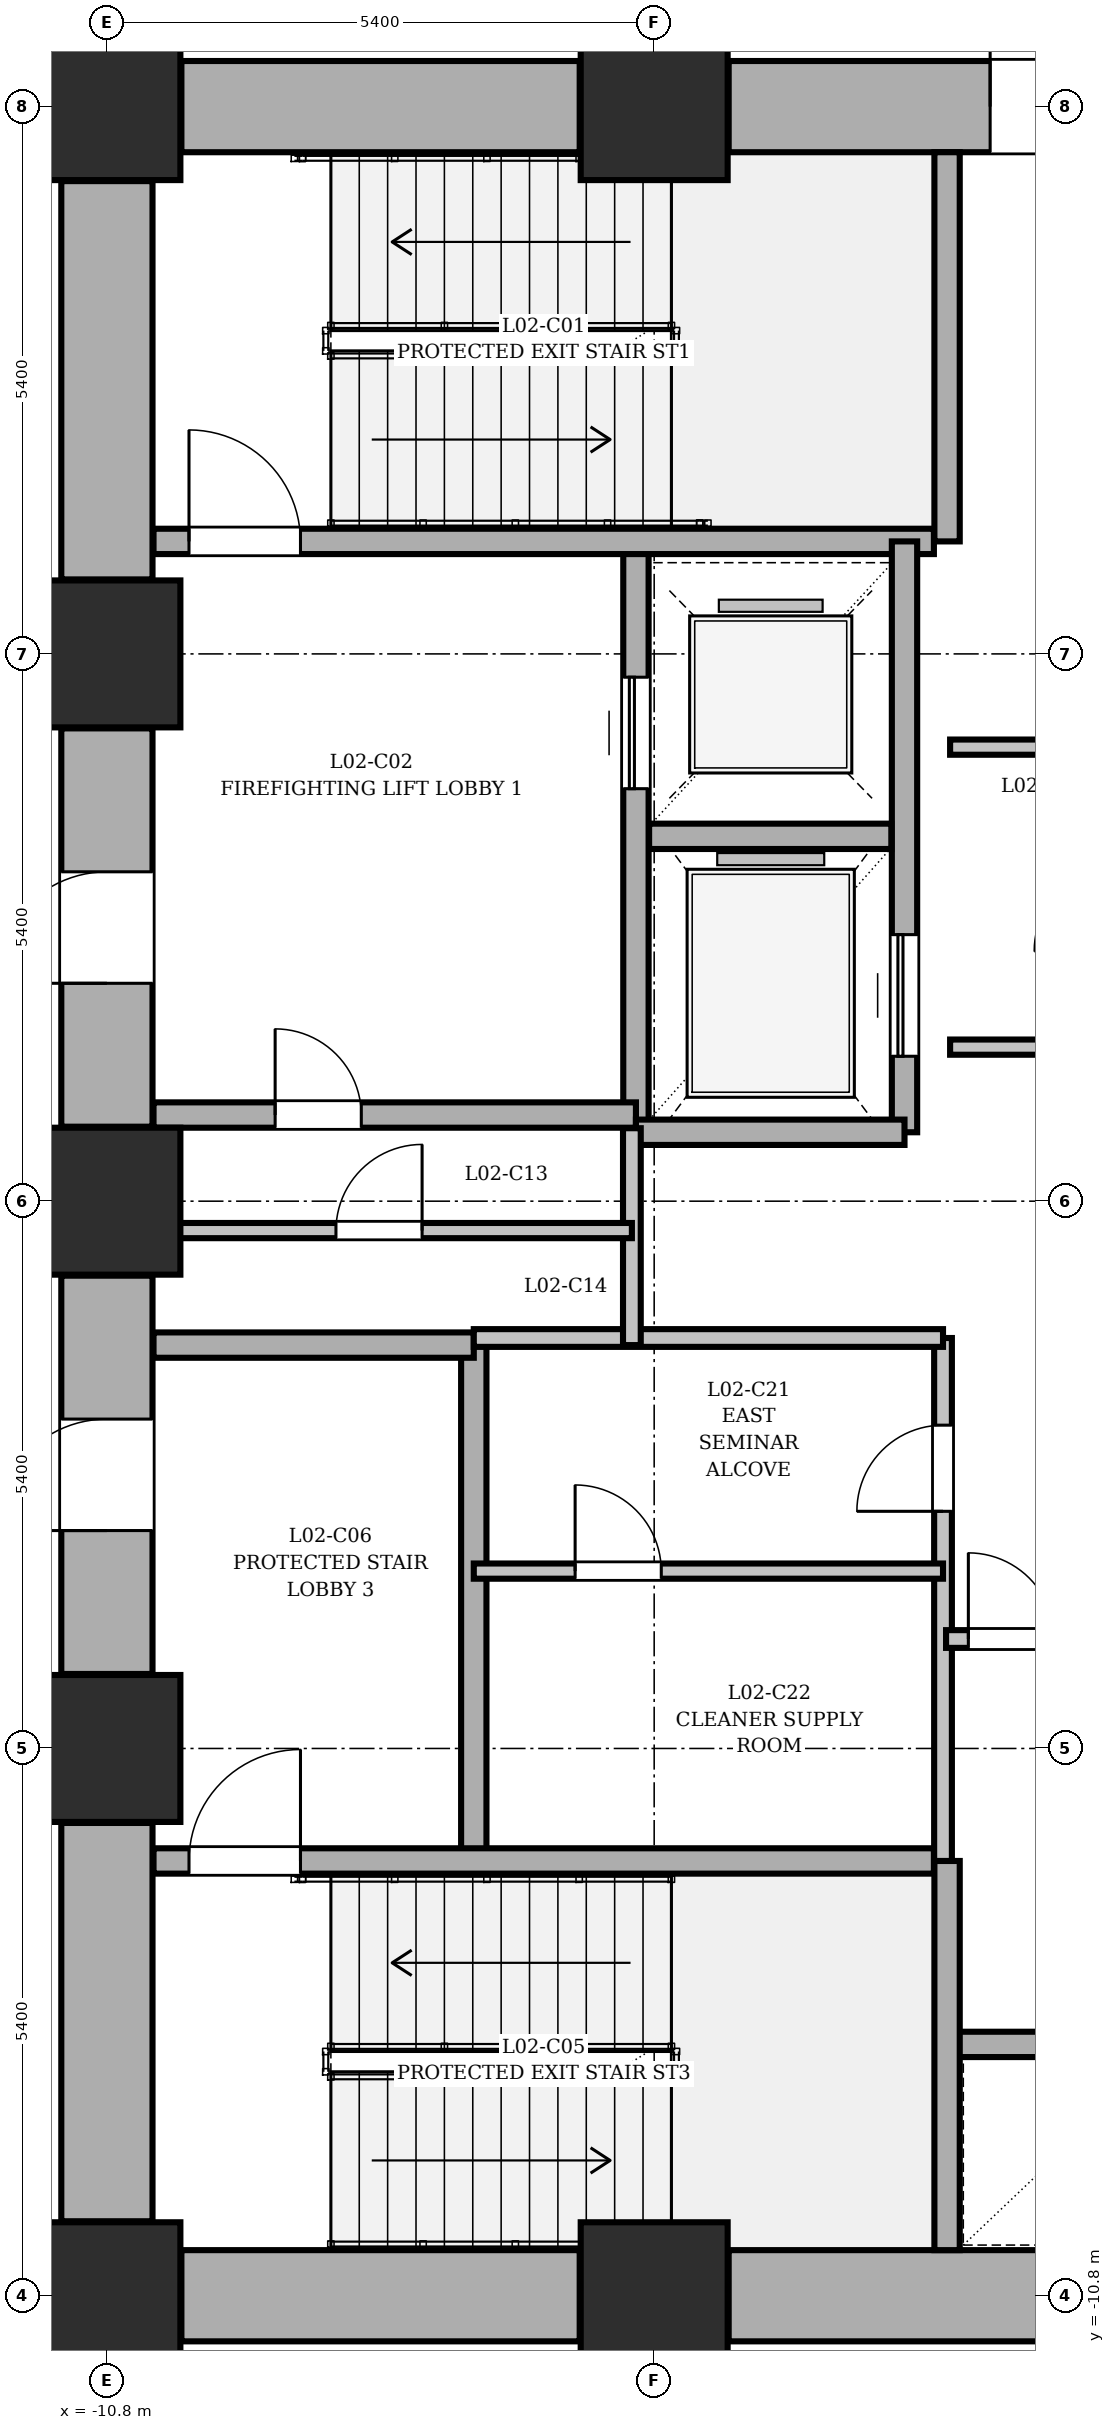
"""IFC4 building model, lengths in metres.
Left out: names, types, materials, properties, quantities, classifications, styles, units other than length and angle.
Written with IfcOpenShell. Run it as: python <this file> out.ifc"""

import sys

from ifc_helpers import new_model, si_unit, direction, frame, frame_2d, origin, origin_2d, place, context, subcontext, project, spatial, rectangle, extrude, element, fill, save


model = new_model("IFC4")
c1 = context("Model", 3, precision=1e-05, world=origin(), true_north=direction((0.0, 1.0)))
c2 = subcontext(c1, "Body", "Model", "MODEL_VIEW")
j1 = project(units=[si_unit("LENGTHUNIT", "METRE"), si_unit("PLANEANGLEUNIT", "RADIAN")], contexts=[c1])
p1 = place(None, origin())
s1 = spatial("IfcSite", under=j1, at=p1, CompositionType="ELEMENT")
p2 = place(p1, origin())
s2 = spatial("IfcBuilding", under=s1, at=p2, CompositionType="ELEMENT")
p3 = place(p2, frame((0.0, 0.0, 9.0)))
s3 = spatial("IfcBuildingStorey", under=s2, at=p3, CompositionType="ELEMENT", Elevation=9.0)
for number, where, z_axis, x_axis in (
    (1, (-10.8, -10.8, 0.0), (0.0, 0.0, 1.0), (1.0, 0.0, 0.0)),
    (2, (-10.8, -5.4, 0.0), (0.0, 0.0, 1.0), (1.0, 0.0, 0.0)),
    (3, (-10.8, 0.0, 0.0), (0.0, 0.0, 1.0), (1.0, 0.0, 0.0)),
    (4, (-10.8, 5.4, 0.0), (0.0, 0.0, 1.0), (1.0, 0.0, 0.0)),
    (5, (-10.8, 10.8, 0.0), (0.0, 0.0, 1.0), (1.0, 0.0, 0.0)),
    (6, (-5.4, -10.8, 0.0), (0.0, 0.0, 1.0), (1.0, 0.0, 0.0)),
    (7, (-5.4, 10.8, 0.0), (0.0, 0.0, 1.0), (1.0, 0.0, 0.0)),
):
    element("IfcColumn", number, at=place(p3, frame(where, z_axis=z_axis, x_axis=x_axis)), inside=s3, PredefinedType="COLUMN", context=c2, shape_type="SweptSolid", body=[
        extrude(rectangle(XDim=1.45, YDim=1.45, at=origin_2d()), origin(), (0.0, 0.0, 1.0), 4.5),
    ])
for number, where, z_axis, x_axis in (
    (8, (-10.065, -10.8, 0.0), (0.0, 0.0, 1.0), (1.0, 0.0, 0.0)),
    (9, (-10.065, 10.8, 0.0), (0.0, 0.0, 1.0), (1.0, 0.0, 0.0)),
    (10, (-10.8, -10.065, 0.0), (0.0, 0.0, 1.0), (0.0, 1.0, 0.0)),
    (11, (-4.665, -10.8, 0.0), (0.0, 0.0, 1.0), (1.0, 0.0, 0.0)),
):
    element("IfcWall", number, at=place(p3, frame(where, z_axis=z_axis, x_axis=x_axis)), inside=s3, PredefinedType="SHEAR", context=c2, shape_type="SweptSolid", body=[
        extrude(rectangle(XDim=3.93, YDim=0.9, at=frame_2d((1.965, 0.0))), origin(), (0.0, 0.0, 1.0), 4.5),
    ])
p4 = place(p3, frame((-4.665, 10.8, 0.0), z_axis=(0.0, 0.0, 1.0), x_axis=(1.0, 0.0, 0.0)))
e12 = element("IfcWall", 12, at=p4, inside=s3, PredefinedType="SHEAR", context=c2, shape_type="SweptSolid", body=[
    extrude(rectangle(XDim=3.93, YDim=0.9, at=frame_2d((1.965, 0.0))), origin(), (0.0, 0.0, 1.0), 4.5),
])
p5 = place(p4, frame((2.58, 0.0, 0.0)))
e13 = element("IfcOpeningElement", 13, at=p5, cuts=e12, PredefinedType="OPENING", context=c2, shape_type="SweptSolid", body=[
    extrude(rectangle(XDim=1.1, YDim=2.1, at=frame_2d((0.55, 1.05))), frame((0.0, 0.46, 0.0), z_axis=(0.0, -1.0, 0.0), x_axis=(1.0, 0.0, 0.0)), (0.0, 0.0, 1.0), 0.92),
])
p6 = place(p3, frame((-10.8, -4.665, 0.0), z_axis=(0.0, 0.0, 1.0), x_axis=(0.0, 1.0, 0.0)))
e14 = element("IfcWall", 14, at=p6, inside=s3, PredefinedType="SHEAR", context=c2, shape_type="SweptSolid", body=[
    extrude(rectangle(XDim=3.93, YDim=0.9, at=frame_2d((1.965, 0.0))), origin(), (0.0, 0.0, 1.0), 4.5),
])
p7 = place(p6, frame((1.415, 0.0, 0.0)))
e15 = element("IfcOpeningElement", 15, at=p7, cuts=e14, PredefinedType="OPENING", context=c2, shape_type="SweptSolid", body=[
    extrude(rectangle(XDim=1.1, YDim=2.1, at=frame_2d((0.55, 1.05))), frame((0.0, 0.46, 0.0), z_axis=(0.0, -1.0, 0.0), x_axis=(1.0, 0.0, 0.0)), (0.0, 0.0, 1.0), 0.92),
])
p8 = place(p3, frame((-10.8, 0.735, 0.0), z_axis=(0.0, 0.0, 1.0), x_axis=(0.0, 1.0, 0.0)))
e16 = element("IfcWall", 16, at=p8, inside=s3, PredefinedType="SHEAR", context=c2, shape_type="SweptSolid", body=[
    extrude(rectangle(XDim=3.93, YDim=0.9, at=frame_2d((1.965, 0.0))), origin(), (0.0, 0.0, 1.0), 4.5),
])
p9 = place(p8, frame((1.415, 0.0, 0.0)))
e17 = element("IfcOpeningElement", 17, at=p9, cuts=e16, PredefinedType="OPENING", context=c2, shape_type="SweptSolid", body=[
    extrude(rectangle(XDim=1.1, YDim=2.1, at=frame_2d((0.55, 1.05))), frame((0.0, 0.46, 0.0), z_axis=(0.0, -1.0, 0.0), x_axis=(1.0, 0.0, 0.0)), (0.0, 0.0, 1.0), 0.92),
])
p10 = place(p3, frame((-10.8, 6.135, 0.0), z_axis=(0.0, 0.0, 1.0), x_axis=(0.0, 1.0, 0.0)))
e18 = element("IfcWall", 18, at=p10, inside=s3, PredefinedType="SHEAR", context=c2, shape_type="SweptSolid", body=[
    extrude(rectangle(XDim=3.93, YDim=0.9, at=frame_2d((1.965, 0.0))), origin(), (0.0, 0.0, 1.0), 4.5),
])
p11 = place(p3, frame((-5.58, 0.72, 0.0), z_axis=(0.0, 0.0, 1.0), x_axis=(0.0, 1.0, 0.0)))
e19 = element("IfcWall", 19, at=p11, inside=s3, PredefinedType="SHEAR", context=c2, shape_type="SweptSolid", body=[
    extrude(rectangle(XDim=5.79, YDim=0.25, at=frame_2d((2.895, 0.0))), origin(), (0.0, 0.0, 1.0), 4.5),
])
p12 = place(p11, frame((3.35, 0.0, 0.0)))
e20 = element("IfcOpeningElement", 20, at=p12, cuts=e19, PredefinedType="OPENING", context=c2, shape_type="SweptSolid", body=[
    extrude(rectangle(XDim=1.1, YDim=2.1, at=frame_2d((0.55, 1.05))), frame((0.0, 0.135, 0.0), z_axis=(0.0, -1.0, 0.0), x_axis=(1.0, 0.0, 0.0)), (0.0, 0.0, 1.0), 0.27),
])
p13 = place(p3, frame((-10.34, 0.85, 0.0), z_axis=(0.0, 0.0, 1.0), x_axis=(1.0, 0.0, 0.0)))
e21 = element("IfcWall", 21, at=p13, inside=s3, PredefinedType="SHEAR", context=c2, shape_type="SweptSolid", body=[
    extrude(rectangle(XDim=4.76, YDim=0.25, at=frame_2d((2.38, 0.0))), origin(), (0.0, 0.0, 1.0), 4.5),
])
p14 = place(p13, frame((1.2, 0.0, 0.0)))
e22 = element("IfcOpeningElement", 22, at=p14, cuts=e21, PredefinedType="OPENING", context=c2, shape_type="SweptSolid", body=[
    extrude(rectangle(XDim=0.85, YDim=2.1, at=frame_2d((0.425, 1.05))), frame((0.0, 0.135, 0.0), z_axis=(0.0, -1.0, 0.0), x_axis=(1.0, 0.0, 0.0)), (0.0, 0.0, 1.0), 0.27),
])
p15 = place(p3, frame((-2.48, -8.32, 0.0), z_axis=(0.0, 0.0, 1.0), x_axis=(1.0, 0.0, 0.0)))
e23 = element("IfcWall", 23, at=p15, inside=s3, PredefinedType="SHEAR", context=c2, shape_type="SweptSolid", body=[
    extrude(rectangle(XDim=4.93, YDim=0.25, at=frame_2d((2.465, 0.0))), origin(), (0.0, 0.0, 1.0), 4.5),
])
p16 = place(p3, frame((-2.51, 6.51, 0.0), z_axis=(0.0, 0.0, 1.0), x_axis=(0.0, 1.0, 0.0)))
e24 = element("IfcWall", 24, at=p16, inside=s3, PredefinedType="SHEAR", context=c2, shape_type="SweptSolid", body=[
    extrude(rectangle(XDim=3.84, YDim=0.25, at=frame_2d((1.92, 0.0))), origin(), (0.0, 0.0, 1.0), 4.5),
])
p17 = place(p3, frame((-10.34, 6.51, 0.0), z_axis=(0.0, 0.0, 1.0), x_axis=(1.0, 0.0, 0.0)))
e25 = element("IfcWall", 25, at=p17, inside=s3, PredefinedType="SHEAR", context=c2, shape_type="SweptSolid", body=[
    extrude(rectangle(XDim=7.7, YDim=0.25, at=frame_2d((3.85, 0.0))), origin(), (0.0, 0.0, 1.0), 4.5),
])
p18 = place(p17, frame((0.35, 0.0, 0.0)))
e26 = element("IfcOpeningElement", 26, at=p18, cuts=e25, PredefinedType="OPENING", context=c2, shape_type="SweptSolid", body=[
    extrude(rectangle(XDim=1.1, YDim=2.1, at=frame_2d((0.55, 1.05))), frame((0.0, 0.135, 0.0), z_axis=(0.0, -1.0, 0.0), x_axis=(1.0, 0.0, 0.0)), (0.0, 0.0, 1.0), 0.27),
])
p19 = place(p3, frame((-2.51, -10.35, 0.0), z_axis=(0.0, 0.0, 1.0), x_axis=(0.0, 1.0, 0.0)))
e27 = element("IfcWall", 27, at=p19, inside=s3, PredefinedType="SHEAR", context=c2, shape_type="SweptSolid", body=[
    extrude(rectangle(XDim=3.84, YDim=0.25, at=frame_2d((1.92, 0.0))), origin(), (0.0, 0.0, 1.0), 4.5),
])
p20 = place(p3, frame((-7.18, -6.51, 0.0), z_axis=(0.0, 0.0, 1.0), x_axis=(0.0, 1.0, 0.0)))
e28 = element("IfcWall", 28, at=p20, inside=s3, PredefinedType="SHEAR", context=c2, shape_type="SweptSolid", body=[
    extrude(rectangle(XDim=5.09, YDim=0.25, at=frame_2d((2.545, 0.0))), origin(), (0.0, 0.0, 1.0), 4.5),
])
p21 = place(p3, frame((-10.34, -1.42, 0.0), z_axis=(0.0, 0.0, 1.0), x_axis=(1.0, 0.0, 0.0)))
e29 = element("IfcWall", 29, at=p21, inside=s3, PredefinedType="SHEAR", context=c2, shape_type="SweptSolid", body=[
    extrude(rectangle(XDim=3.16, YDim=0.25, at=frame_2d((1.58, 0.0))), origin(), (0.0, 0.0, 1.0), 4.5),
])
p22 = place(p3, frame((-10.34, -6.51, 0.0), z_axis=(0.0, 0.0, 1.0), x_axis=(1.0, 0.0, 0.0)))
e30 = element("IfcWall", 30, at=p22, inside=s3, PredefinedType="SHEAR", context=c2, shape_type="SweptSolid", body=[
    extrude(rectangle(XDim=7.7, YDim=0.25, at=frame_2d((3.85, 0.0))), origin(), (0.0, 0.0, 1.0), 4.5),
])
p23 = place(p22, frame((0.35, 0.0, 0.0)))
e31 = element("IfcOpeningElement", 31, at=p23, cuts=e30, PredefinedType="OPENING", context=c2, shape_type="SweptSolid", body=[
    extrude(rectangle(XDim=1.1, YDim=2.1, at=frame_2d((0.55, 1.05))), frame((0.0, 0.135, 0.0), z_axis=(0.0, -1.0, 0.0), x_axis=(1.0, 0.0, 0.0)), (0.0, 0.0, 1.0), 0.27),
])
p24 = place(p3, frame((-2.93, 0.68, 0.0), z_axis=(0.0, 0.0, 1.0), x_axis=(0.0, 1.0, 0.0)))
e32 = element("IfcWall", 32, at=p24, inside=s3, PredefinedType="SHEAR", context=c2, shape_type="SweptSolid", body=[
    extrude(rectangle(XDim=5.83, YDim=0.25, at=frame_2d((2.915, 0.0))), origin(), (0.0, 0.0, 1.0), 4.5),
])
p25 = place(p24, frame((0.75, 0.0, 0.0)))
e33 = element("IfcOpeningElement", 33, at=p25, cuts=e32, PredefinedType="OPENING", context=c2, shape_type="SweptSolid", body=[
    extrude(rectangle(XDim=1.2, YDim=2.1, at=frame_2d((0.6, 1.05))), frame((0.0, 0.135, 0.0), z_axis=(0.0, -1.0, 0.0), x_axis=(1.0, 0.0, 0.0)), (0.0, 0.0, 1.0), 0.27),
])
p26 = place(p3, frame((-5.45, 3.6, 0.0), z_axis=(0.0, 0.0, 1.0), x_axis=(1.0, 0.0, 0.0)))
e34 = element("IfcWall", 34, at=p26, inside=s3, PredefinedType="SHEAR", context=c2, shape_type="SweptSolid", body=[
    extrude(rectangle(XDim=2.39, YDim=0.25, at=frame_2d((1.195, 0.0))), origin(), (0.0, 0.0, 1.0), 4.5),
])
p27 = place(p3, frame((-5.58, 0.68, 0.0), z_axis=(0.0, 0.0, 1.0), x_axis=(1.0, 0.0, 0.0)))
e35 = element("IfcWall", 35, at=p27, inside=s3, PredefinedType="SHEAR", context=c2, shape_type="SweptSolid", body=[
    extrude(rectangle(XDim=2.65, YDim=0.25, at=frame_2d((1.325, 0.0))), origin(), (0.0, 0.0, 1.0), 4.5),
])
p28 = place(p3, frame((-2.55, -6.51, 0.0), z_axis=(0.0, 0.0, 1.0), x_axis=(0.0, 1.0, 0.0)))
e36 = element("IfcWall", 36, at=p28, inside=s3, PredefinedType="PARTITIONING", context=c2, shape_type="SweptSolid", body=[
    extrude(rectangle(XDim=5.16, YDim=0.175, at=frame_2d((2.58, 0.0))), origin(), (0.0, 0.0, 1.0), 4.25),
])
p29 = place(p28, frame((3.45, 0.0, 0.0)))
e37 = element("IfcOpeningElement", 37, at=p29, cuts=e36, PredefinedType="OPENING", context=c2, shape_type="SweptSolid", body=[
    extrude(rectangle(XDim=0.85, YDim=2.1, at=frame_2d((0.425, 1.05))), frame((0.0, 0.097, 0.0), z_axis=(0.0, -1.0, 0.0), x_axis=(1.0, 0.0, 0.0)), (0.0, 0.0, 1.0), 0.195),
])
p30 = place(p3, frame((-7.18, -3.65, 0.0), z_axis=(0.0, 0.0, 1.0), x_axis=(1.0, 0.0, 0.0)))
e38 = element("IfcWall", 38, at=p30, inside=s3, PredefinedType="PARTITIONING", context=c2, shape_type="SweptSolid", body=[
    extrude(rectangle(XDim=4.63, YDim=0.15, at=frame_2d((2.315, 0.0))), origin(), (0.0, 0.0, 1.0), 4.25),
])
p31 = place(p30, frame((1.0, 0.0, 0.0)))
e39 = element("IfcOpeningElement", 39, at=p31, cuts=e38, PredefinedType="OPENING", context=c2, shape_type="SweptSolid", body=[
    extrude(rectangle(XDim=0.85, YDim=2.1, at=frame_2d((0.425, 1.05))), frame((0.0, 0.085, 0.0), z_axis=(0.0, -1.0, 0.0), x_axis=(1.0, 0.0, 0.0)), (0.0, 0.0, 1.0), 0.17),
])
p32 = place(p3, frame((-7.18, -1.35, 0.0), z_axis=(0.0, 0.0, 1.0), x_axis=(1.0, 0.0, 0.0)))
e40 = element("IfcWall", 40, at=p32, inside=s3, PredefinedType="PARTITIONING", context=c2, shape_type="SweptSolid", body=[
    extrude(rectangle(XDim=4.63, YDim=0.175, at=frame_2d((2.315, 0.0))), origin(), (0.0, 0.0, 1.0), 4.25),
])
p33 = place(p3, frame((-5.62, -1.42, 0.0), z_axis=(0.0, 0.0, 1.0), x_axis=(0.0, 1.0, 0.0)))
e41 = element("IfcWall", 41, at=p33, inside=s3, PredefinedType="PARTITIONING", context=c2, shape_type="SweptSolid", body=[
    extrude(rectangle(XDim=2.14, YDim=0.175, at=frame_2d((1.07, 0.0))), origin(), (0.0, 0.0, 1.0), 4.25),
])
p34 = place(p3, frame((-10.34, -0.29, 0.0), z_axis=(0.0, 0.0, 1.0), x_axis=(1.0, 0.0, 0.0)))
e42 = element("IfcWall", 42, at=p34, inside=s3, PredefinedType="PARTITIONING", context=c2, shape_type="SweptSolid", body=[
    extrude(rectangle(XDim=4.72, YDim=0.15, at=frame_2d((2.36, 0.0))), origin(), (0.0, 0.0, 1.0), 4.25),
])
p35 = place(p34, frame((1.8, 0.0, 0.0)))
e43 = element("IfcOpeningElement", 43, at=p35, cuts=e42, PredefinedType="OPENING", context=c2, shape_type="SweptSolid", body=[
    extrude(rectangle(XDim=0.85, YDim=2.1, at=frame_2d((0.425, 1.05))), frame((0.0, 0.085, 0.0), z_axis=(0.0, -1.0, 0.0), x_axis=(1.0, 0.0, 0.0)), (0.0, 0.0, 1.0), 0.17),
])
p36 = place(p3, frame((-2.52, -4.32, 0.0), z_axis=(0.0, 0.0, 1.0), x_axis=(1.0, 0.0, 0.0)))
e44 = element("IfcWall", 44, at=p36, inside=s3, PredefinedType="PARTITIONING", context=c2, shape_type="SweptSolid", body=[
    extrude(rectangle(XDim=1.3, YDim=0.175, at=frame_2d((0.65, 0.0))), origin(), (0.0, 0.0, 1.0), 4.25),
])
p37 = place(p36, frame((0.22, 0.0, 0.0)))
e45 = element("IfcOpeningElement", 45, at=p37, cuts=e44, PredefinedType="OPENING", context=c2, shape_type="SweptSolid", body=[
    extrude(rectangle(XDim=0.85, YDim=2.1, at=frame_2d((0.425, 1.05))), frame((0.0, 0.097, 0.0), z_axis=(0.0, -1.0, 0.0), x_axis=(1.0, 0.0, 0.0)), (0.0, 0.0, 1.0), 0.195),
])
for number, where, z_axis, x_axis in (
    (46, (-2.48, 4.48, 0.0), (0.0, 0.0, 1.0), (1.0, 0.0, 0.0)),
    (47, (-2.48, 1.52, 0.0), (0.0, 0.0, 1.0), (1.0, 0.0, 0.0)),
):
    element("IfcWall", number, at=place(p3, frame(where, z_axis=z_axis, x_axis=x_axis)), inside=s3, PredefinedType="PARTITIONING", context=c2, shape_type="SweptSolid", body=[
        extrude(rectangle(XDim=1.68, YDim=0.15, at=frame_2d((0.84, 0.0))), origin(), (0.0, 0.0, 1.0), 4.25),
    ])
p38 = place(p18, origin())
e48 = element("IfcDoor", 48, at=p38, inside=s3, OperationType="SINGLE_SWING_LEFT", PredefinedType="DOOR", context=c2, shape_type="SweptSolid", body=[
    extrude(rectangle(XDim=1.1, YDim=2.1, at=frame_2d((0.55, 1.05))), frame((0.0, 0.025, 0.0), z_axis=(0.0, -1.0, 0.0), x_axis=(1.0, 0.0, 0.0)), (0.0, 0.0, 1.0), 0.05),
])
fill(e26, e48)
p39 = place(p23, origin())
e49 = element("IfcDoor", 49, at=p39, inside=s3, OperationType="SINGLE_SWING_RIGHT", PredefinedType="DOOR", context=c2, shape_type="SweptSolid", body=[
    extrude(rectangle(XDim=1.1, YDim=2.1, at=frame_2d((0.55, 1.05))), frame((0.0, 0.025, 0.0), z_axis=(0.0, -1.0, 0.0), x_axis=(1.0, 0.0, 0.0)), (0.0, 0.0, 1.0), 0.05),
])
fill(e31, e49)
p40 = place(p5, origin())
e50 = element("IfcDoor", 50, at=p40, inside=s3, OperationType="SINGLE_SWING_LEFT", PredefinedType="DOOR", context=c2, shape_type="SweptSolid", body=[
    extrude(rectangle(XDim=1.1, YDim=2.1, at=frame_2d((0.55, 1.05))), frame((0.0, 0.025, 0.0), z_axis=(0.0, -1.0, 0.0), x_axis=(1.0, 0.0, 0.0)), (0.0, 0.0, 1.0), 0.05),
])
fill(e13, e50)
p41 = place(p9, origin())
e51 = element("IfcDoor", 51, at=p41, inside=s3, OperationType="SINGLE_SWING_LEFT", PredefinedType="DOOR", context=c2, shape_type="SweptSolid", body=[
    extrude(rectangle(XDim=1.1, YDim=2.1, at=frame_2d((0.55, 1.05))), frame((0.0, 0.025, 0.0), z_axis=(0.0, -1.0, 0.0), x_axis=(1.0, 0.0, 0.0)), (0.0, 0.0, 1.0), 0.05),
])
fill(e17, e51)
p42 = place(p7, origin())
e52 = element("IfcDoor", 52, at=p42, inside=s3, OperationType="SINGLE_SWING_LEFT", PredefinedType="DOOR", context=c2, shape_type="SweptSolid", body=[
    extrude(rectangle(XDim=1.1, YDim=2.1, at=frame_2d((0.55, 1.05))), frame((0.0, 0.025, 0.0), z_axis=(0.0, -1.0, 0.0), x_axis=(1.0, 0.0, 0.0)), (0.0, 0.0, 1.0), 0.05),
])
fill(e15, e52)
p43 = place(p14, origin())
e53 = element("IfcDoor", 53, at=p43, inside=s3, OperationType="SINGLE_SWING_LEFT", PredefinedType="DOOR", context=c2, shape_type="SweptSolid", body=[
    extrude(rectangle(XDim=0.85, YDim=2.1, at=frame_2d((0.425, 1.05))), frame((0.0, 0.025, 0.0), z_axis=(0.0, -1.0, 0.0), x_axis=(1.0, 0.0, 0.0)), (0.0, 0.0, 1.0), 0.05),
])
fill(e22, e53)
p44 = place(p35, origin())
e54 = element("IfcDoor", 54, at=p44, inside=s3, OperationType="SINGLE_SWING_RIGHT", PredefinedType="DOOR", context=c2, shape_type="SweptSolid", body=[
    extrude(rectangle(XDim=0.85, YDim=2.1, at=frame_2d((0.425, 1.05))), frame((0.0, 0.025, 0.0), z_axis=(0.0, -1.0, 0.0), x_axis=(1.0, 0.0, 0.0)), (0.0, 0.0, 1.0), 0.05),
])
fill(e43, e54)
p45 = place(p12, origin())
e55 = element("IfcDoor", 55, at=p45, inside=s3, OperationType="SLIDING_TO_LEFT", PredefinedType="DOOR", context=c2, shape_type="SweptSolid", body=[
    extrude(rectangle(XDim=1.1, YDim=2.1, at=frame_2d((0.55, 1.05))), frame((0.0, 0.025, 0.0), z_axis=(0.0, -1.0, 0.0), x_axis=(1.0, 0.0, 0.0)), (0.0, 0.0, 1.0), 0.05),
])
fill(e20, e55)
p46 = place(p25, origin())
e56 = element("IfcDoor", 56, at=p46, inside=s3, OperationType="SLIDING_TO_LEFT", PredefinedType="DOOR", context=c2, shape_type="SweptSolid", body=[
    extrude(rectangle(XDim=1.2, YDim=2.1, at=frame_2d((0.6, 1.05))), frame((0.0, 0.025, 0.0), z_axis=(0.0, -1.0, 0.0), x_axis=(1.0, 0.0, 0.0)), (0.0, 0.0, 1.0), 0.05),
])
fill(e33, e56)
p47 = place(p37, origin())
e57 = element("IfcDoor", 57, at=p47, inside=s3, OperationType="SINGLE_SWING_LEFT", PredefinedType="DOOR", context=c2, shape_type="SweptSolid", body=[
    extrude(rectangle(XDim=0.85, YDim=2.1, at=frame_2d((0.425, 1.05))), frame((0.0, 0.025, 0.0), z_axis=(0.0, -1.0, 0.0), x_axis=(1.0, 0.0, 0.0)), (0.0, 0.0, 1.0), 0.05),
])
fill(e45, e57)
p48 = place(p29, origin())
e58 = element("IfcDoor", 58, at=p48, inside=s3, OperationType="SINGLE_SWING_LEFT", PredefinedType="DOOR", context=c2, shape_type="SweptSolid", body=[
    extrude(rectangle(XDim=0.85, YDim=2.1, at=frame_2d((0.425, 1.05))), frame((0.0, 0.025, 0.0), z_axis=(0.0, -1.0, 0.0), x_axis=(1.0, 0.0, 0.0)), (0.0, 0.0, 1.0), 0.05),
])
fill(e37, e58)
p49 = place(p31, origin())
e59 = element("IfcDoor", 59, at=p49, inside=s3, OperationType="SINGLE_SWING_LEFT", PredefinedType="DOOR", context=c2, shape_type="SweptSolid", body=[
    extrude(rectangle(XDim=0.85, YDim=2.1, at=frame_2d((0.425, 1.05))), frame((0.0, 0.025, 0.0), z_axis=(0.0, -1.0, 0.0), x_axis=(1.0, 0.0, 0.0)), (0.0, 0.0, 1.0), 0.05),
])
fill(e39, e59)
save(model, sys.argv[1])
